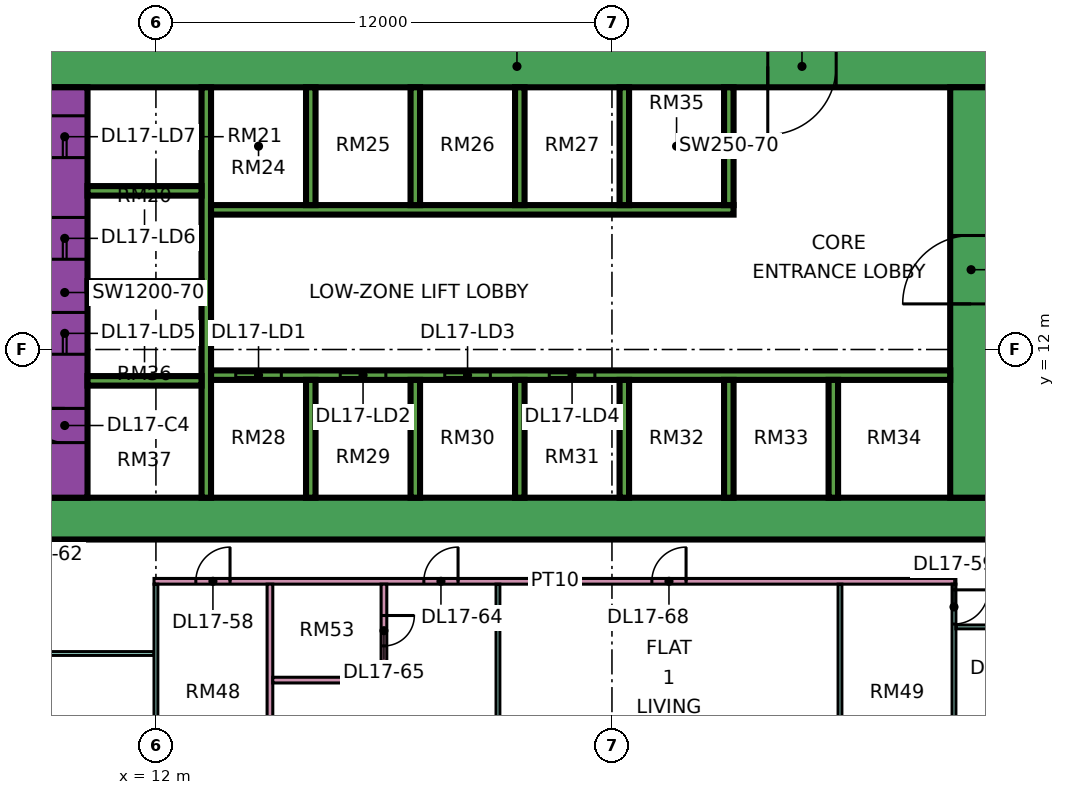
"""IFC4 building model, lengths in metres.
Left out: names, types, materials, properties, quantities, classifications, styles, units other than length and angle.
Written with IfcOpenShell. Run it as: python <this file> out.ifc"""

import sys

from ifc_helpers import new_model, si_unit, direction, frame, frame_2d, origin, place, context, subcontext, project, spatial, rectangle, extrude, element, fill, save


model = new_model("IFC4")
c1 = context("Model", 3, precision=1e-05, world=origin(), true_north=direction((0.0, 1.0)))
c2 = subcontext(c1, "Body", "Model", "MODEL_VIEW")
j1 = project(units=[si_unit("LENGTHUNIT", "METRE"), si_unit("PLANEANGLEUNIT", "RADIAN")], contexts=[c1])
p1 = place(None, origin())
s1 = spatial("IfcSite", under=j1, at=p1, CompositionType="ELEMENT")
p2 = place(p1, origin())
s2 = spatial("IfcBuilding", under=s1, at=p2, CompositionType="ELEMENT")
p3 = place(p2, frame((0.0, 0.0, 78.9)))
s3 = spatial("IfcBuildingStorey", under=s2, at=p3, CompositionType="ELEMENT", Elevation=78.9)
p4 = place(p3, frame((9.0, 7.55, 0.0), z_axis=(0.0, 0.0, 1.0), x_axis=(1.0, 0.0, 0.0)))
e1 = element("IfcWall", 1, at=p4, inside=s3, PredefinedType="SHEAR", context=c2, shape_type="SweptSolid", body=[
    extrude(rectangle(XDim=25.0, YDim=1.1, at=frame_2d((12.5, 0.0))), origin(), (0.0, 0.0, 1.0), 3.75),
])
p5 = place(p3, frame((9.0, 19.45, 0.0), z_axis=(0.0, 0.0, 1.0), x_axis=(1.0, 0.0, 0.0)))
e2 = element("IfcWall", 2, at=p5, inside=s3, PredefinedType="SHEAR", context=c2, shape_type="SweptSolid", body=[
    extrude(rectangle(XDim=25.0, YDim=1.1, at=frame_2d((12.5, 0.0))), origin(), (0.0, 0.0, 1.0), 3.75),
])
p6 = place(p5, frame((19.1, 0.0, 0.0)))
e3 = element("IfcOpeningElement", 3, at=p6, cuts=e2, PredefinedType="OPENING", context=c2, shape_type="SweptSolid", body=[
    extrude(rectangle(XDim=1.8, YDim=2.4, at=frame_2d((0.9, 1.2))), frame((0.0, 0.56, 0.0), z_axis=(0.0, -1.0, 0.0), x_axis=(1.0, 0.0, 0.0)), (0.0, 0.0, 1.0), 1.12),
])
p7 = place(p3, frame((9.6, 8.1, 0.0), z_axis=(0.0, 0.0, 1.0), x_axis=(0.0, 1.0, 0.0)))
e4 = element("IfcWall", 4, at=p7, inside=s3, PredefinedType="SHEAR", context=c2, shape_type="SweptSolid", body=[
    extrude(rectangle(XDim=10.8, YDim=1.2, at=frame_2d((5.4, 0.0))), origin(), (0.0, 0.0, 1.0), 3.75),
])
p8 = place(p7, frame((3.775, 0.0, 0.0)))
e5 = element("IfcOpeningElement", 5, at=p8, cuts=e4, PredefinedType="OPENING", context=c2, shape_type="SweptSolid", body=[
    extrude(rectangle(XDim=1.1, YDim=2.2, at=frame_2d((0.55, 1.1))), frame((0.0, 0.61, 0.0), z_axis=(0.0, -1.0, 0.0), x_axis=(1.0, 0.0, 0.0)), (0.0, 0.0, 1.0), 1.22),
])
p9 = place(p7, frame((6.275, 0.0, 0.0)))
e6 = element("IfcOpeningElement", 6, at=p9, cuts=e4, PredefinedType="OPENING", context=c2, shape_type="SweptSolid", body=[
    extrude(rectangle(XDim=1.1, YDim=2.2, at=frame_2d((0.55, 1.1))), frame((0.0, 0.61, 0.0), z_axis=(0.0, -1.0, 0.0), x_axis=(1.0, 0.0, 0.0)), (0.0, 0.0, 1.0), 1.22),
])
p10 = place(p7, frame((8.95, 0.0, 0.0)))
e7 = element("IfcOpeningElement", 7, at=p10, cuts=e4, PredefinedType="OPENING", context=c2, shape_type="SweptSolid", body=[
    extrude(rectangle(XDim=1.1, YDim=2.2, at=frame_2d((0.55, 1.1))), frame((0.0, 0.61, 0.0), z_axis=(0.0, -1.0, 0.0), x_axis=(1.0, 0.0, 0.0)), (0.0, 0.0, 1.0), 1.22),
])
p11 = place(p7, frame((1.45, 0.0, 0.0)))
e8 = element("IfcOpeningElement", 8, at=p11, cuts=e4, PredefinedType="OPENING", context=c2, shape_type="SweptSolid", body=[
    extrude(rectangle(XDim=0.9, YDim=2.1, at=frame_2d((0.45, 1.05))), frame((0.0, 0.61, 0.0), z_axis=(0.0, -1.0, 0.0), x_axis=(1.0, 0.0, 0.0)), (0.0, 0.0, 1.0), 1.22),
])
p12 = place(p3, frame((33.45, 8.1, 0.0), z_axis=(0.0, 0.0, 1.0), x_axis=(0.0, 1.0, 0.0)))
e9 = element("IfcWall", 9, at=p12, inside=s3, PredefinedType="SHEAR", context=c2, shape_type="SweptSolid", body=[
    extrude(rectangle(XDim=10.8, YDim=1.1, at=frame_2d((5.4, 0.0))), origin(), (0.0, 0.0, 1.0), 3.75),
])
p13 = place(p12, frame((5.1, 0.0, 0.0)))
e10 = element("IfcOpeningElement", 10, at=p13, cuts=e9, PredefinedType="OPENING", context=c2, shape_type="SweptSolid", body=[
    extrude(rectangle(XDim=1.8, YDim=2.4, at=frame_2d((0.9, 1.2))), frame((0.0, 0.56, 0.0), z_axis=(0.0, -1.0, 0.0), x_axis=(1.0, 0.0, 0.0)), (0.0, 0.0, 1.0), 1.12),
])
p14 = place(p3, frame((13.325, 8.1, 0.0), z_axis=(0.0, 0.0, 1.0), x_axis=(0.0, 1.0, 0.0)))
e11 = element("IfcWall", 11, at=p14, inside=s3, PredefinedType="SHEAR", context=c2, shape_type="SweptSolid", body=[
    extrude(rectangle(XDim=10.8, YDim=0.25, at=frame_2d((5.4, 0.0))), origin(), (0.0, 0.0, 1.0), 3.75),
])
p15 = place(p3, frame((13.45, 11.325, 0.0), z_axis=(0.0, 0.0, 1.0), x_axis=(1.0, 0.0, 0.0)))
e12 = element("IfcWall", 12, at=p15, inside=s3, PredefinedType="SHEAR", context=c2, shape_type="SweptSolid", body=[
    extrude(rectangle(XDim=19.45, YDim=0.25, at=frame_2d((9.725, 0.0))), origin(), (0.0, 0.0, 1.0), 3.75),
])
p16 = place(p15, frame((0.65, 0.0, 0.0)))
e13 = element("IfcOpeningElement", 13, at=p16, cuts=e12, PredefinedType="OPENING", context=c2, shape_type="SweptSolid", body=[
    extrude(rectangle(XDim=1.2, YDim=2.2, at=frame_2d((0.6, 1.1))), frame((0.0, 0.135, 0.0), z_axis=(0.0, -1.0, 0.0), x_axis=(1.0, 0.0, 0.0)), (0.0, 0.0, 1.0), 0.27),
])
p17 = place(p15, frame((3.4, 0.0, 0.0)))
e14 = element("IfcOpeningElement", 14, at=p17, cuts=e12, PredefinedType="OPENING", context=c2, shape_type="SweptSolid", body=[
    extrude(rectangle(XDim=1.2, YDim=2.2, at=frame_2d((0.6, 1.1))), frame((0.0, 0.135, 0.0), z_axis=(0.0, -1.0, 0.0), x_axis=(1.0, 0.0, 0.0)), (0.0, 0.0, 1.0), 0.27),
])
p18 = place(p15, frame((6.15, 0.0, 0.0)))
e15 = element("IfcOpeningElement", 15, at=p18, cuts=e12, PredefinedType="OPENING", context=c2, shape_type="SweptSolid", body=[
    extrude(rectangle(XDim=1.2, YDim=2.2, at=frame_2d((0.6, 1.1))), frame((0.0, 0.135, 0.0), z_axis=(0.0, -1.0, 0.0), x_axis=(1.0, 0.0, 0.0)), (0.0, 0.0, 1.0), 0.27),
])
p19 = place(p15, frame((8.9, 0.0, 0.0)))
e16 = element("IfcOpeningElement", 16, at=p19, cuts=e12, PredefinedType="OPENING", context=c2, shape_type="SweptSolid", body=[
    extrude(rectangle(XDim=1.2, YDim=2.2, at=frame_2d((0.6, 1.1))), frame((0.0, 0.135, 0.0), z_axis=(0.0, -1.0, 0.0), x_axis=(1.0, 0.0, 0.0)), (0.0, 0.0, 1.0), 0.27),
])
p20 = place(p3, frame((13.45, 15.675, 0.0), z_axis=(0.0, 0.0, 1.0), x_axis=(1.0, 0.0, 0.0)))
e17 = element("IfcWall", 17, at=p20, inside=s3, PredefinedType="SHEAR", context=c2, shape_type="SweptSolid", body=[
    extrude(rectangle(XDim=13.75, YDim=0.25, at=frame_2d((6.875, 0.0))), origin(), (0.0, 0.0, 1.0), 3.75),
])
for number, where, z_axis, x_axis in (
    (18, (10.2, 11.175, 0.0), (0.0, 0.0, 1.0), (1.0, 0.0, 0.0)),
    (19, (10.2, 13.675, 0.0), (0.0, 0.0, 1.0), (1.0, 0.0, 0.0)),
    (20, (10.2, 16.175, 0.0), (0.0, 0.0, 1.0), (1.0, 0.0, 0.0)),
):
    element("IfcWall", number, at=place(p3, frame(where, z_axis=z_axis, x_axis=x_axis)), inside=s3, PredefinedType="SHEAR", context=c2, shape_type="SweptSolid", body=[
        extrude(rectangle(XDim=3.0, YDim=0.25, at=frame_2d((1.5, 0.0))), origin(), (0.0, 0.0, 1.0), 3.75),
    ])
for number, where, z_axis, x_axis in (
    (21, (16.075, 8.1, 0.0), (0.0, 0.0, 1.0), (0.0, 1.0, 0.0)),
    (22, (18.825, 8.1, 0.0), (0.0, 0.0, 1.0), (0.0, 1.0, 0.0)),
    (23, (21.575, 8.1, 0.0), (0.0, 0.0, 1.0), (0.0, 1.0, 0.0)),
    (24, (24.325, 8.1, 0.0), (0.0, 0.0, 1.0), (0.0, 1.0, 0.0)),
    (25, (27.075, 8.1, 0.0), (0.0, 0.0, 1.0), (0.0, 1.0, 0.0)),
    (26, (29.825, 8.1, 0.0), (0.0, 0.0, 1.0), (0.0, 1.0, 0.0)),
    (27, (16.075, 15.8, 0.0), (0.0, 0.0, 1.0), (0.0, 1.0, 0.0)),
    (28, (18.825, 15.8, 0.0), (0.0, 0.0, 1.0), (0.0, 1.0, 0.0)),
    (29, (21.575, 15.8, 0.0), (0.0, 0.0, 1.0), (0.0, 1.0, 0.0)),
    (30, (24.325, 15.8, 0.0), (0.0, 0.0, 1.0), (0.0, 1.0, 0.0)),
    (31, (27.075, 15.8, 0.0), (0.0, 0.0, 1.0), (0.0, 1.0, 0.0)),
):
    element("IfcWall", number, at=place(p3, frame(where, z_axis=z_axis, x_axis=x_axis)), inside=s3, PredefinedType="SHEAR", context=c2, shape_type="SweptSolid", body=[
        extrude(rectangle(XDim=3.1, YDim=0.25, at=frame_2d((1.55, 0.0))), origin(), (0.0, 0.0, 1.0), 3.75),
    ])
p21 = place(p3, frame((-1.447, 12.553, 0.0), z_axis=(0.0, 0.0, 1.0), x_axis=(0.707106781187, -0.707106781187, 0.0)))
e32 = element("IfcWall", 32, at=p21, inside=s3, PredefinedType="SOLIDWALL", context=c2, shape_type="SweptSolid", body=[
    extrude(rectangle(XDim=19.799, YDim=0.15, at=frame_2d((9.899, 0.0))), origin(), (0.0, 0.0, 1.0), 3.35),
])
p22 = place(p21, frame((2.212, 0.0, 0.45)))
e33 = element("IfcOpeningElement", 33, at=p22, cuts=e32, PredefinedType="OPENING", context=c2, shape_type="SweptSolid", body=[
    extrude(rectangle(XDim=3.0, YDim=2.4, at=frame_2d((1.5, 1.2))), frame((0.0, 0.085, 0.0), z_axis=(0.0, -1.0, 0.0), x_axis=(1.0, 0.0, 0.0)), (0.0, 0.0, 1.0), 0.17),
])
p23 = place(p21, frame((10.216, 0.0, 0.45)))
e34 = element("IfcOpeningElement", 34, at=p23, cuts=e32, PredefinedType="OPENING", context=c2, shape_type="SweptSolid", body=[
    extrude(rectangle(XDim=3.0, YDim=2.4, at=frame_2d((1.5, 1.2))), frame((0.0, 0.085, 0.0), z_axis=(0.0, -1.0, 0.0), x_axis=(1.0, 0.0, 0.0)), (0.0, 0.0, 1.0), 0.17),
])
p24 = place(p3, frame((9.05, 4.0, 0.0), z_axis=(0.0, 0.0, 1.0), x_axis=(1.0, 0.0, 0.0)))
e35 = element("IfcWall", 35, at=p24, inside=s3, PredefinedType="PARTITIONING", context=c2, shape_type="SweptSolid", body=[
    extrude(rectangle(XDim=2.9, YDim=0.1, at=frame_2d((1.45, 0.0))), origin(), (0.0, 0.0, 1.0), 3.35),
])
p25 = place(p3, frame((11.95, 5.9, 0.0), z_axis=(0.0, 0.0, 1.0), x_axis=(1.0, 0.0, 0.0)))
e36 = element("IfcWall", 36, at=p25, inside=s3, PredefinedType="PARTITIONING", context=c2, shape_type="SweptSolid", body=[
    extrude(rectangle(XDim=21.1, YDim=0.15, at=frame_2d((10.55, 0.0))), origin(), (0.0, 0.0, 1.0), 3.35),
])
p26 = place(p25, frame((1.1, 0.0, 0.0)))
e37 = element("IfcOpeningElement", 37, at=p26, cuts=e36, PredefinedType="OPENING", context=c2, shape_type="SweptSolid", body=[
    extrude(rectangle(XDim=0.9, YDim=2.1, at=frame_2d((0.45, 1.05))), frame((0.0, 0.085, 0.0), z_axis=(0.0, -1.0, 0.0), x_axis=(1.0, 0.0, 0.0)), (0.0, 0.0, 1.0), 0.17),
])
p27 = place(p25, frame((7.1, 0.0, 0.0)))
e38 = element("IfcOpeningElement", 38, at=p27, cuts=e36, PredefinedType="OPENING", context=c2, shape_type="SweptSolid", body=[
    extrude(rectangle(XDim=0.9, YDim=2.1, at=frame_2d((0.45, 1.05))), frame((0.0, 0.085, 0.0), z_axis=(0.0, -1.0, 0.0), x_axis=(1.0, 0.0, 0.0)), (0.0, 0.0, 1.0), 0.17),
])
p28 = place(p25, frame((13.1, 0.0, 0.0)))
e39 = element("IfcOpeningElement", 39, at=p28, cuts=e36, PredefinedType="OPENING", context=c2, shape_type="SweptSolid", body=[
    extrude(rectangle(XDim=0.9, YDim=2.1, at=frame_2d((0.45, 1.05))), frame((0.0, 0.085, 0.0), z_axis=(0.0, -1.0, 0.0), x_axis=(1.0, 0.0, 0.0)), (0.0, 0.0, 1.0), 0.17),
])
p29 = place(p3, frame((12.0, -0.788, 0.0), z_axis=(0.0, 0.0, 1.0), x_axis=(0.0, 1.0, 0.0)))
e40 = element("IfcWall", 40, at=p29, inside=s3, PredefinedType="PARTITIONING", context=c2, shape_type="SweptSolid", body=[
    extrude(rectangle(XDim=6.613, YDim=0.1, at=frame_2d((3.306, 0.0))), origin(), (0.0, 0.0, 1.0), 3.35),
])
p30 = place(p3, frame((15.0, -1.351, 0.0), z_axis=(0.0, 0.0, 1.0), x_axis=(0.0, 1.0, 0.0)))
e41 = element("IfcWall", 41, at=p30, inside=s3, PredefinedType="PARTITIONING", context=c2, shape_type="SweptSolid", body=[
    extrude(rectangle(XDim=7.176, YDim=0.15, at=frame_2d((3.588, 0.0))), origin(), (0.0, 0.0, 1.0), 3.35),
])
p31 = place(p3, frame((15.075, 3.3, 0.0), z_axis=(0.0, 0.0, 1.0), x_axis=(1.0, 0.0, 0.0)))
e42 = element("IfcWall", 42, at=p31, inside=s3, PredefinedType="PARTITIONING", context=c2, shape_type="SweptSolid", body=[
    extrude(rectangle(XDim=3.0, YDim=0.15, at=frame_2d((1.5, 0.0))), origin(), (0.0, 0.0, 1.0), 3.35),
])
p32 = place(p3, frame((18.0, 3.375, 0.0), z_axis=(0.0, 0.0, 1.0), x_axis=(0.0, 1.0, 0.0)))
e43 = element("IfcWall", 43, at=p32, inside=s3, PredefinedType="PARTITIONING", context=c2, shape_type="SweptSolid", body=[
    extrude(rectangle(XDim=2.45, YDim=0.15, at=frame_2d((1.225, 0.0))), origin(), (0.0, 0.0, 1.0), 3.35),
])
p33 = place(p32, frame((0.825, 0.0, 0.0)))
e44 = element("IfcOpeningElement", 44, at=p33, cuts=e43, PredefinedType="OPENING", context=c2, shape_type="SweptSolid", body=[
    extrude(rectangle(XDim=0.8, YDim=2.1, at=frame_2d((0.4, 1.05))), frame((0.0, 0.085, 0.0), z_axis=(0.0, -1.0, 0.0), x_axis=(1.0, 0.0, 0.0)), (0.0, 0.0, 1.0), 0.17),
])
p34 = place(p3, frame((21.0, -1.35, 0.0), z_axis=(0.0, 0.0, 1.0), x_axis=(0.0, 1.0, 0.0)))
e45 = element("IfcWall", 45, at=p34, inside=s3, PredefinedType="PARTITIONING", context=c2, shape_type="SweptSolid", body=[
    extrude(rectangle(XDim=7.175, YDim=0.1, at=frame_2d((3.587, 0.0))), origin(), (0.0, 0.0, 1.0), 3.35),
])
p35 = place(p3, frame((30.0, 0.074, 0.0), z_axis=(0.0, 0.0, 1.0), x_axis=(0.0, 1.0, 0.0)))
e46 = element("IfcWall", 46, at=p35, inside=s3, PredefinedType="PARTITIONING", context=c2, shape_type="SweptSolid", body=[
    extrude(rectangle(XDim=5.751, YDim=0.1, at=frame_2d((2.875, 0.0))), origin(), (0.0, 0.0, 1.0), 3.35),
])
p36 = place(p3, frame((33.0, 0.074, 0.0), z_axis=(0.0, 0.0, 1.0), x_axis=(0.0, 1.0, 0.0)))
e47 = element("IfcWall", 47, at=p36, inside=s3, PredefinedType="PARTITIONING", context=c2, shape_type="SweptSolid", body=[
    extrude(rectangle(XDim=5.751, YDim=0.1, at=frame_2d((2.875, 0.0))), origin(), (0.0, 0.0, 1.0), 3.35),
])
p37 = place(p36, frame((4.701, 0.0, 0.0)))
e48 = element("IfcOpeningElement", 48, at=p37, cuts=e47, PredefinedType="OPENING", context=c2, shape_type="SweptSolid", body=[
    extrude(rectangle(XDim=0.9, YDim=2.1, at=frame_2d((0.45, 1.05))), frame((0.0, 0.06, 0.0), z_axis=(0.0, -1.0, 0.0), x_axis=(1.0, 0.0, 0.0)), (0.0, 0.0, 1.0), 0.12),
])
p38 = place(p3, frame((33.05, 4.7, 0.0), z_axis=(0.0, 0.0, 1.0), x_axis=(1.0, 0.0, 0.0)))
e49 = element("IfcWall", 49, at=p38, inside=s3, PredefinedType="PARTITIONING", context=c2, shape_type="SweptSolid", body=[
    extrude(rectangle(XDim=14.85, YDim=0.1, at=frame_2d((7.425, 0.0))), origin(), (0.0, 0.0, 1.0), 3.35),
])
p39 = place(p38, frame((1.0, 0.0, 0.0)))
e50 = element("IfcOpeningElement", 50, at=p39, cuts=e49, PredefinedType="OPENING", context=c2, shape_type="SweptSolid", body=[
    extrude(rectangle(XDim=0.9, YDim=2.1, at=frame_2d((0.45, 1.05))), frame((0.0, 0.06, 0.0), z_axis=(0.0, -1.0, 0.0), x_axis=(1.0, 0.0, 0.0)), (0.0, 0.0, 1.0), 0.12),
])
p40 = place(p38, frame((4.0, 0.0, 0.0)))
e51 = element("IfcOpeningElement", 51, at=p40, cuts=e49, PredefinedType="OPENING", context=c2, shape_type="SweptSolid", body=[
    extrude(rectangle(XDim=0.9, YDim=2.1, at=frame_2d((0.45, 1.05))), frame((0.0, 0.06, 0.0), z_axis=(0.0, -1.0, 0.0), x_axis=(1.0, 0.0, 0.0)), (0.0, 0.0, 1.0), 0.12),
])
p41 = place(p38, frame((10.0, 0.0, 0.0)))
e52 = element("IfcOpeningElement", 52, at=p41, cuts=e49, PredefinedType="OPENING", context=c2, shape_type="SweptSolid", body=[
    extrude(rectangle(XDim=0.9, YDim=2.1, at=frame_2d((0.45, 1.05))), frame((0.0, 0.06, 0.0), z_axis=(0.0, -1.0, 0.0), x_axis=(1.0, 0.0, 0.0)), (0.0, 0.0, 1.0), 0.12),
])
p42 = place(p16, origin())
e53 = element("IfcDoor", 53, at=p42, inside=s3, OperationType="DOUBLE_DOOR_SLIDING", PredefinedType="DOOR", context=c2, shape_type="SweptSolid", body=[
    extrude(rectangle(XDim=1.2, YDim=2.2, at=frame_2d((0.6, 1.1))), frame((0.0, 0.025, 0.0), z_axis=(0.0, -1.0, 0.0), x_axis=(1.0, 0.0, 0.0)), (0.0, 0.0, 1.0), 0.05),
])
fill(e13, e53)
p43 = place(p17, origin())
e54 = element("IfcDoor", 54, at=p43, inside=s3, OperationType="DOUBLE_DOOR_SLIDING", PredefinedType="DOOR", context=c2, shape_type="SweptSolid", body=[
    extrude(rectangle(XDim=1.2, YDim=2.2, at=frame_2d((0.6, 1.1))), frame((0.0, 0.025, 0.0), z_axis=(0.0, -1.0, 0.0), x_axis=(1.0, 0.0, 0.0)), (0.0, 0.0, 1.0), 0.05),
])
fill(e14, e54)
p44 = place(p18, origin())
e55 = element("IfcDoor", 55, at=p44, inside=s3, OperationType="DOUBLE_DOOR_SLIDING", PredefinedType="DOOR", context=c2, shape_type="SweptSolid", body=[
    extrude(rectangle(XDim=1.2, YDim=2.2, at=frame_2d((0.6, 1.1))), frame((0.0, 0.025, 0.0), z_axis=(0.0, -1.0, 0.0), x_axis=(1.0, 0.0, 0.0)), (0.0, 0.0, 1.0), 0.05),
])
fill(e15, e55)
p45 = place(p19, origin())
e56 = element("IfcDoor", 56, at=p45, inside=s3, OperationType="DOUBLE_DOOR_SLIDING", PredefinedType="DOOR", context=c2, shape_type="SweptSolid", body=[
    extrude(rectangle(XDim=1.2, YDim=2.2, at=frame_2d((0.6, 1.1))), frame((0.0, 0.025, 0.0), z_axis=(0.0, -1.0, 0.0), x_axis=(1.0, 0.0, 0.0)), (0.0, 0.0, 1.0), 0.05),
])
fill(e16, e56)
p46 = place(p8, origin())
e57 = element("IfcDoor", 57, at=p46, inside=s3, OperationType="DOUBLE_DOOR_SLIDING", PredefinedType="DOOR", context=c2, shape_type="SweptSolid", body=[
    extrude(rectangle(XDim=1.1, YDim=2.2, at=frame_2d((0.55, 1.1))), frame((0.0, 0.025, 0.0), z_axis=(0.0, -1.0, 0.0), x_axis=(1.0, 0.0, 0.0)), (0.0, 0.0, 1.0), 0.05),
])
fill(e5, e57)
p47 = place(p9, origin())
e58 = element("IfcDoor", 58, at=p47, inside=s3, OperationType="DOUBLE_DOOR_SLIDING", PredefinedType="DOOR", context=c2, shape_type="SweptSolid", body=[
    extrude(rectangle(XDim=1.1, YDim=2.2, at=frame_2d((0.55, 1.1))), frame((0.0, 0.025, 0.0), z_axis=(0.0, -1.0, 0.0), x_axis=(1.0, 0.0, 0.0)), (0.0, 0.0, 1.0), 0.05),
])
fill(e6, e58)
p48 = place(p10, origin())
e59 = element("IfcDoor", 59, at=p48, inside=s3, OperationType="DOUBLE_DOOR_SLIDING", PredefinedType="DOOR", context=c2, shape_type="SweptSolid", body=[
    extrude(rectangle(XDim=1.1, YDim=2.2, at=frame_2d((0.55, 1.1))), frame((0.0, 0.025, 0.0), z_axis=(0.0, -1.0, 0.0), x_axis=(1.0, 0.0, 0.0)), (0.0, 0.0, 1.0), 0.05),
])
fill(e7, e59)
p49 = place(p13, origin())
e60 = element("IfcDoor", 60, at=p49, inside=s3, OperationType="DOUBLE_DOOR_SINGLE_SWING", PredefinedType="DOOR", context=c2, shape_type="SweptSolid", body=[
    extrude(rectangle(XDim=1.8, YDim=2.4, at=frame_2d((0.9, 1.2))), frame((0.0, 0.025, 0.0), z_axis=(0.0, -1.0, 0.0), x_axis=(1.0, 0.0, 0.0)), (0.0, 0.0, 1.0), 0.05),
])
fill(e10, e60)
p50 = place(p6, frame((1.8, 0.0, 0.0), z_axis=(0.0, 0.0, 1.0), x_axis=(-1.0, 0.0, 0.0)))
e61 = element("IfcDoor", 61, at=p50, inside=s3, OperationType="DOUBLE_DOOR_SINGLE_SWING", PredefinedType="DOOR", context=c2, shape_type="SweptSolid", body=[
    extrude(rectangle(XDim=1.8, YDim=2.4, at=frame_2d((0.9, 1.2))), frame((0.0, 0.025, 0.0), z_axis=(0.0, -1.0, 0.0), x_axis=(1.0, 0.0, 0.0)), (0.0, 0.0, 1.0), 0.05),
])
fill(e3, e61)
p51 = place(p11, frame((0.9, 0.0, 0.0), z_axis=(0.0, 0.0, 1.0), x_axis=(-1.0, 0.0, 0.0)))
e62 = element("IfcDoor", 62, at=p51, inside=s3, OperationType="SINGLE_SWING_RIGHT", PredefinedType="DOOR", context=c2, shape_type="SweptSolid", body=[
    extrude(rectangle(XDim=0.9, YDim=2.1, at=frame_2d((0.45, 1.05))), frame((0.0, 0.025, 0.0), z_axis=(0.0, -1.0, 0.0), x_axis=(1.0, 0.0, 0.0)), (0.0, 0.0, 1.0), 0.05),
])
fill(e8, e62)
p52 = place(p26, frame((0.9, 0.0, 0.0), z_axis=(0.0, 0.0, 1.0), x_axis=(-1.0, 0.0, 0.0)))
e63 = element("IfcDoor", 63, at=p52, inside=s3, OperationType="SINGLE_SWING_RIGHT", PredefinedType="DOOR", context=c2, shape_type="SweptSolid", body=[
    extrude(rectangle(XDim=0.9, YDim=2.1, at=frame_2d((0.45, 1.05))), frame((0.0, 0.025, 0.0), z_axis=(0.0, -1.0, 0.0), x_axis=(1.0, 0.0, 0.0)), (0.0, 0.0, 1.0), 0.05),
])
fill(e37, e63)
p53 = place(p37, origin())
e64 = element("IfcDoor", 64, at=p53, inside=s3, OperationType="SINGLE_SWING_RIGHT", PredefinedType="DOOR", context=c2, shape_type="SweptSolid", body=[
    extrude(rectangle(XDim=0.9, YDim=2.1, at=frame_2d((0.45, 1.05))), frame((0.0, 0.025, 0.0), z_axis=(0.0, -1.0, 0.0), x_axis=(1.0, 0.0, 0.0)), (0.0, 0.0, 1.0), 0.05),
])
fill(e48, e64)
p54 = place(p27, frame((0.9, 0.0, 0.0), z_axis=(0.0, 0.0, 1.0), x_axis=(-1.0, 0.0, 0.0)))
e65 = element("IfcDoor", 65, at=p54, inside=s3, OperationType="SINGLE_SWING_RIGHT", PredefinedType="DOOR", context=c2, shape_type="SweptSolid", body=[
    extrude(rectangle(XDim=0.9, YDim=2.1, at=frame_2d((0.45, 1.05))), frame((0.0, 0.025, 0.0), z_axis=(0.0, -1.0, 0.0), x_axis=(1.0, 0.0, 0.0)), (0.0, 0.0, 1.0), 0.05),
])
fill(e38, e65)
p55 = place(p33, origin())
e66 = element("IfcDoor", 66, at=p55, inside=s3, OperationType="SINGLE_SWING_RIGHT", PredefinedType="DOOR", context=c2, shape_type="SweptSolid", body=[
    extrude(rectangle(XDim=0.8, YDim=2.1, at=frame_2d((0.4, 1.05))), frame((0.0, 0.025, 0.0), z_axis=(0.0, -1.0, 0.0), x_axis=(1.0, 0.0, 0.0)), (0.0, 0.0, 1.0), 0.05),
])
fill(e44, e66)
p56 = place(p28, frame((0.9, 0.0, 0.0), z_axis=(0.0, 0.0, 1.0), x_axis=(-1.0, 0.0, 0.0)))
e67 = element("IfcDoor", 67, at=p56, inside=s3, OperationType="SINGLE_SWING_RIGHT", PredefinedType="DOOR", context=c2, shape_type="SweptSolid", body=[
    extrude(rectangle(XDim=0.9, YDim=2.1, at=frame_2d((0.45, 1.05))), frame((0.0, 0.025, 0.0), z_axis=(0.0, -1.0, 0.0), x_axis=(1.0, 0.0, 0.0)), (0.0, 0.0, 1.0), 0.05),
])
fill(e39, e67)
save(model, sys.argv[1])
